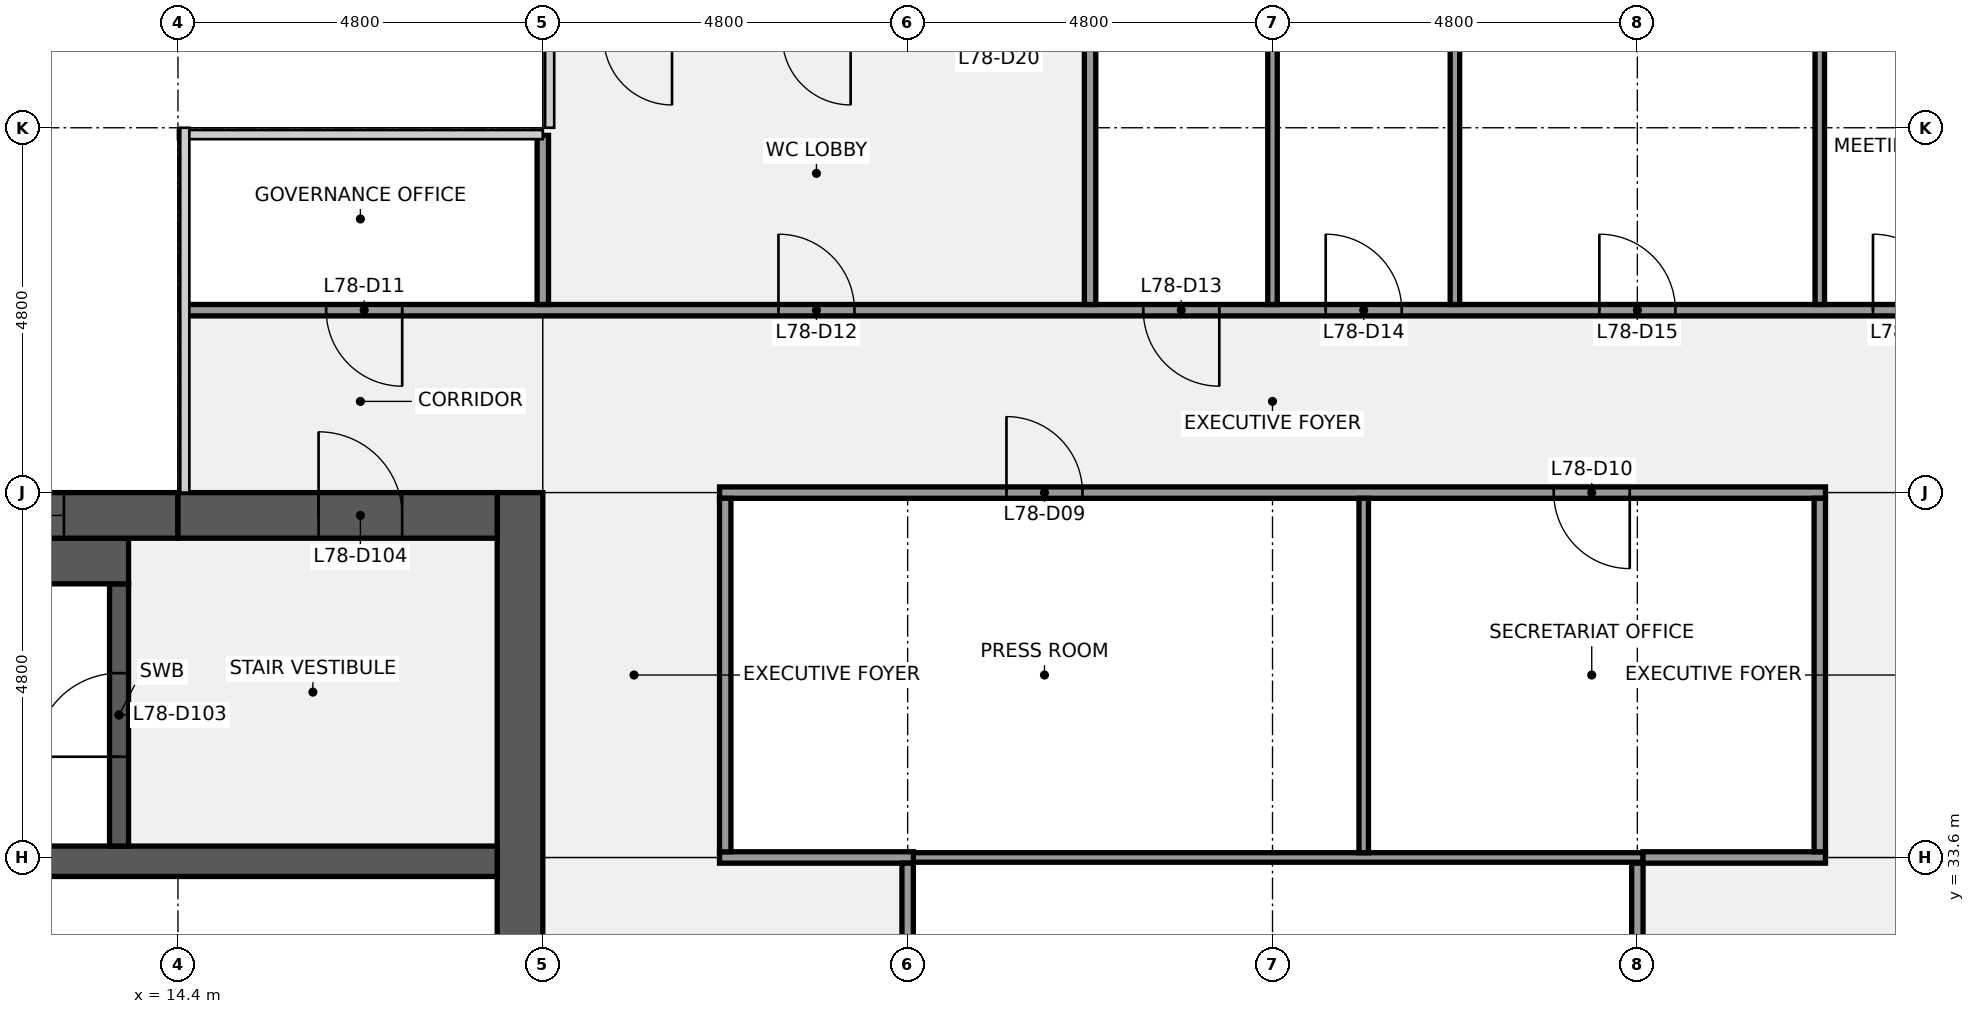
"""IFC4 building model, lengths in metres.
Left out: names, types, materials, properties, quantities, classifications, styles, units other than length and angle.
Written with IfcOpenShell. Run it as: python <this file> out.ifc"""

import sys

from ifc_helpers import new_model, si_unit, direction, frame, frame_2d, origin, place, context, subcontext, project, spatial, rectangle, extrude, element, fill, save


model = new_model("IFC4")
c1 = context("Model", 3, precision=1e-05, world=origin(), true_north=direction((0.0, 1.0)))
c2 = subcontext(c1, "Body", "Model", "MODEL_VIEW")
j1 = project(units=[si_unit("LENGTHUNIT", "METRE"), si_unit("PLANEANGLEUNIT", "RADIAN")], contexts=[c1])
p1 = place(None, origin())
s1 = spatial("IfcSite", under=j1, at=p1, CompositionType="ELEMENT")
p2 = place(p1, origin())
s2 = spatial("IfcBuilding", under=s1, at=p2, CompositionType="ELEMENT")
p3 = place(p2, frame((0.0, 0.0, 350.3)))
s3 = spatial("IfcBuildingStorey", under=s2, at=p3, CompositionType="ELEMENT", Elevation=350.3)
p4 = place(p3, frame((18.9, 38.4, 0.0), z_axis=(0.0, 0.0, 1.0), x_axis=(0.0, -1.0, 0.0)))
e1 = element("IfcWall", 1, at=p4, inside=s3, PredefinedType="SHEAR", context=c2, shape_type="SweptSolid", body=[
    extrude(rectangle(XDim=28.8, YDim=0.6, at=frame_2d((14.4, 0.0))), origin(), (0.0, 0.0, 1.0), 3.75),
])
p5 = place(p4, frame((18.3, 0.0, 0.0)))
e2 = element("IfcOpeningElement", 2, at=p5, cuts=e1, PredefinedType="OPENING", context=c2, shape_type="SweptSolid", body=[
    extrude(rectangle(XDim=1.8, YDim=2.1, at=frame_2d((0.9, 1.05))), frame((0.0, 0.31, 0.0), z_axis=(0.0, -1.0, 0.0), x_axis=(1.0, 0.0, 0.0)), (0.0, 0.0, 1.0), 0.62),
])
p6 = place(p4, frame((8.7, 0.0, 0.0)))
e3 = element("IfcOpeningElement", 3, at=p6, cuts=e1, PredefinedType="OPENING", context=c2, shape_type="SweptSolid", body=[
    extrude(rectangle(XDim=1.8, YDim=2.1, at=frame_2d((0.9, 1.05))), frame((0.0, 0.31, 0.0), z_axis=(0.0, -1.0, 0.0), x_axis=(1.0, 0.0, 0.0)), (0.0, 0.0, 1.0), 0.62),
])
p7 = place(p3, frame((0.6, 33.55, 0.0), z_axis=(0.0, 0.0, 1.0), x_axis=(1.0, 0.0, 0.0)))
e4 = element("IfcWall", 4, at=p7, inside=s3, PredefinedType="SHEAR", context=c2, shape_type="SweptSolid", body=[
    extrude(rectangle(XDim=18.0, YDim=0.4, at=frame_2d((9.0, 0.0))), origin(), (0.0, 0.0, 1.0), 3.75),
])
p8 = place(p3, frame((13.625, 33.75, 0.0), z_axis=(0.0, 0.0, 1.0), x_axis=(0.0, 1.0, 0.0)))
e5 = element("IfcWall", 5, at=p8, inside=s3, PredefinedType="SHEAR", context=c2, shape_type="SweptSolid", body=[
    extrude(rectangle(XDim=3.45, YDim=0.25, at=frame_2d((1.725, 0.0))), origin(), (0.0, 0.0, 1.0), 3.75),
])
p9 = place(p8, frame((1.175, 0.0, 0.0)))
e6 = element("IfcOpeningElement", 6, at=p9, cuts=e5, PredefinedType="OPENING", context=c2, shape_type="SweptSolid", body=[
    extrude(rectangle(XDim=1.1, YDim=2.1, at=frame_2d((0.55, 1.05))), frame((0.0, 0.135, 0.0), z_axis=(0.0, -1.0, 0.0), x_axis=(1.0, 0.0, 0.0)), (0.0, 0.0, 1.0), 0.27),
])
p10 = place(p3, frame((6.25, 37.5, 0.0), z_axis=(0.0, 0.0, 1.0), x_axis=(1.0, 0.0, 0.0)))
e7 = element("IfcWall", 7, at=p10, inside=s3, PredefinedType="SHEAR", context=c2, shape_type="SweptSolid", body=[
    extrude(rectangle(XDim=7.5, YDim=0.6, at=frame_2d((3.75, 0.0))), origin(), (0.0, 0.0, 1.0), 3.75),
])
p11 = place(p3, frame((0.6, 38.1, 0.0), z_axis=(0.0, 0.0, 1.0), x_axis=(1.0, 0.0, 0.0)))
e8 = element("IfcWall", 8, at=p11, inside=s3, PredefinedType="SHEAR", context=c2, shape_type="SweptSolid", body=[
    extrude(rectangle(XDim=13.8, YDim=0.6, at=frame_2d((6.9, 0.0))), origin(), (0.0, 0.0, 1.0), 3.75),
])
p12 = place(p11, frame((5.7, 0.0, 0.9)))
e9 = element("IfcOpeningElement", 9, at=p12, cuts=e8, PredefinedType="OPENING", context=c2, shape_type="SweptSolid", body=[
    extrude(rectangle(XDim=1.8, YDim=1.5, at=frame_2d((0.9, 0.75))), frame((0.0, 0.31, 0.0), z_axis=(0.0, -1.0, 0.0), x_axis=(1.0, 0.0, 0.0)), (0.0, 0.0, 1.0), 0.62),
])
p13 = place(p11, frame((10.5, 0.0, 0.9)))
e10 = element("IfcOpeningElement", 10, at=p13, cuts=e8, PredefinedType="OPENING", context=c2, shape_type="SweptSolid", body=[
    extrude(rectangle(XDim=1.8, YDim=1.5, at=frame_2d((0.9, 0.75))), frame((0.0, 0.31, 0.0), z_axis=(0.0, -1.0, 0.0), x_axis=(1.0, 0.0, 0.0)), (0.0, 0.0, 1.0), 0.62),
])
p14 = place(p3, frame((14.4, 38.1, 0.0), z_axis=(0.0, 0.0, 1.0), x_axis=(1.0, 0.0, 0.0)))
e11 = element("IfcWall", 11, at=p14, inside=s3, PredefinedType="SHEAR", context=c2, shape_type="SweptSolid", body=[
    extrude(rectangle(XDim=4.2, YDim=0.6, at=frame_2d((2.1, 0.0))), origin(), (0.0, 0.0, 1.0), 3.75),
])
p15 = place(p14, frame((1.85, 0.0, 0.0)))
e12 = element("IfcOpeningElement", 12, at=p15, cuts=e11, PredefinedType="OPENING", context=c2, shape_type="SweptSolid", body=[
    extrude(rectangle(XDim=1.1, YDim=2.1, at=frame_2d((0.55, 1.05))), frame((0.0, 0.31, 0.0), z_axis=(0.0, -1.0, 0.0), x_axis=(1.0, 0.0, 0.0)), (0.0, 0.0, 1.0), 0.62),
])
p16 = place(p3, frame((24.075, 33.6, 0.0), z_axis=(0.0, 0.0, 1.0), x_axis=(1.0, 0.0, 0.0)))
e13 = element("IfcWall", 13, at=p16, inside=s3, PredefinedType="PARTITIONING", context=c2, shape_type="SweptSolid", body=[
    extrude(rectangle(XDim=9.6, YDim=0.125, at=frame_2d((4.8, 0.0))), origin(), (0.0, 0.0, 1.0), 2.759),
])
p17 = place(p3, frame((21.525, 33.6, 0.0), z_axis=(0.0, 0.0, 1.0), x_axis=(1.0, 0.0, 0.0)))
e14 = element("IfcWall", 14, at=p17, inside=s3, PredefinedType="PARTITIONING", context=c2, shape_type="SweptSolid", body=[
    extrude(rectangle(XDim=2.55, YDim=0.15, at=frame_2d((1.275, 0.0))), origin(), (0.0, 0.0, 1.0), 2.759),
])
p18 = place(p3, frame((33.675, 33.6, 0.0), z_axis=(0.0, 0.0, 1.0), x_axis=(1.0, 0.0, 0.0)))
e15 = element("IfcWall", 15, at=p18, inside=s3, PredefinedType="PARTITIONING", context=c2, shape_type="SweptSolid", body=[
    extrude(rectangle(XDim=2.4, YDim=0.15, at=frame_2d((1.2, 0.0))), origin(), (0.0, 0.0, 1.0), 2.759),
])
p19 = place(p3, frame((21.525, 38.4, 0.0), z_axis=(0.0, 0.0, 1.0), x_axis=(1.0, 0.0, 0.0)))
e16 = element("IfcWall", 16, at=p19, inside=s3, PredefinedType="PARTITIONING", context=c2, shape_type="SweptSolid", body=[
    extrude(rectangle(XDim=14.55, YDim=0.15, at=frame_2d((7.275, 0.0))), origin(), (0.0, 0.0, 1.0), 2.759),
])
p20 = place(p19, frame((3.775, 0.0, 0.0)))
e17 = element("IfcOpeningElement", 17, at=p20, cuts=e16, PredefinedType="OPENING", context=c2, shape_type="SweptSolid", body=[
    extrude(rectangle(XDim=1.0, YDim=2.1, at=frame_2d((0.5, 1.05))), frame((0.0, 0.085, 0.0), z_axis=(0.0, -1.0, 0.0), x_axis=(1.0, 0.0, 0.0)), (0.0, 0.0, 1.0), 0.17),
])
p21 = place(p19, frame((10.975, 0.0, 0.0)))
e18 = element("IfcOpeningElement", 18, at=p21, cuts=e16, PredefinedType="OPENING", context=c2, shape_type="SweptSolid", body=[
    extrude(rectangle(XDim=1.0, YDim=2.1, at=frame_2d((0.5, 1.05))), frame((0.0, 0.085, 0.0), z_axis=(0.0, -1.0, 0.0), x_axis=(1.0, 0.0, 0.0)), (0.0, 0.0, 1.0), 0.17),
])
p22 = place(p3, frame((14.5, 40.8, 0.0), z_axis=(0.0, 0.0, 1.0), x_axis=(1.0, 0.0, 0.0)))
e19 = element("IfcWall", 19, at=p22, inside=s3, PredefinedType="PARTITIONING", context=c2, shape_type="SweptSolid", body=[
    extrude(rectangle(XDim=28.6, YDim=0.15, at=frame_2d((14.3, 0.0))), origin(), (0.0, 0.0, 1.0), 2.759),
])
p23 = place(p22, frame((1.85, 0.0, 0.0)))
e20 = element("IfcOpeningElement", 20, at=p23, cuts=e19, PredefinedType="OPENING", context=c2, shape_type="SweptSolid", body=[
    extrude(rectangle(XDim=1.0, YDim=2.1, at=frame_2d((0.5, 1.05))), frame((0.0, 0.085, 0.0), z_axis=(0.0, -1.0, 0.0), x_axis=(1.0, 0.0, 0.0)), (0.0, 0.0, 1.0), 0.17),
])
p24 = place(p22, frame((7.8, 0.0, 0.0)))
e21 = element("IfcOpeningElement", 21, at=p24, cuts=e19, PredefinedType="OPENING", context=c2, shape_type="SweptSolid", body=[
    extrude(rectangle(XDim=1.0, YDim=2.1, at=frame_2d((0.5, 1.05))), frame((0.0, 0.085, 0.0), z_axis=(0.0, -1.0, 0.0), x_axis=(1.0, 0.0, 0.0)), (0.0, 0.0, 1.0), 0.17),
])
p25 = place(p22, frame((12.6, 0.0, 0.0)))
e22 = element("IfcOpeningElement", 22, at=p25, cuts=e19, PredefinedType="OPENING", context=c2, shape_type="SweptSolid", body=[
    extrude(rectangle(XDim=1.0, YDim=2.1, at=frame_2d((0.5, 1.05))), frame((0.0, 0.085, 0.0), z_axis=(0.0, -1.0, 0.0), x_axis=(1.0, 0.0, 0.0)), (0.0, 0.0, 1.0), 0.17),
])
p26 = place(p22, frame((15.0, 0.0, 0.0)))
e23 = element("IfcOpeningElement", 23, at=p26, cuts=e19, PredefinedType="OPENING", context=c2, shape_type="SweptSolid", body=[
    extrude(rectangle(XDim=1.0, YDim=2.1, at=frame_2d((0.5, 1.05))), frame((0.0, 0.085, 0.0), z_axis=(0.0, -1.0, 0.0), x_axis=(1.0, 0.0, 0.0)), (0.0, 0.0, 1.0), 0.17),
])
p27 = place(p22, frame((18.6, 0.0, 0.0)))
e24 = element("IfcOpeningElement", 24, at=p27, cuts=e19, PredefinedType="OPENING", context=c2, shape_type="SweptSolid", body=[
    extrude(rectangle(XDim=1.0, YDim=2.1, at=frame_2d((0.5, 1.05))), frame((0.0, 0.085, 0.0), z_axis=(0.0, -1.0, 0.0), x_axis=(1.0, 0.0, 0.0)), (0.0, 0.0, 1.0), 0.17),
])
p28 = place(p22, frame((22.2, 0.0, 0.0)))
e25 = element("IfcOpeningElement", 25, at=p28, cuts=e19, PredefinedType="OPENING", context=c2, shape_type="SweptSolid", body=[
    extrude(rectangle(XDim=1.0, YDim=2.1, at=frame_2d((0.5, 1.05))), frame((0.0, 0.085, 0.0), z_axis=(0.0, -1.0, 0.0), x_axis=(1.0, 0.0, 0.0)), (0.0, 0.0, 1.0), 0.17),
])
p29 = place(p22, frame((25.75, 0.0, 0.0)))
e26 = element("IfcOpeningElement", 26, at=p29, cuts=e19, PredefinedType="OPENING", context=c2, shape_type="SweptSolid", body=[
    extrude(rectangle(XDim=1.0, YDim=2.1, at=frame_2d((0.5, 1.05))), frame((0.0, 0.085, 0.0), z_axis=(0.0, -1.0, 0.0), x_axis=(1.0, 0.0, 0.0)), (0.0, 0.0, 1.0), 0.17),
])
p30 = place(p3, frame((19.2, 40.875, 0.0), z_axis=(0.0, 0.0, 1.0), x_axis=(0.0, 1.0, 0.0)))
e27 = element("IfcWall", 27, at=p30, inside=s3, PredefinedType="PARTITIONING", context=c2, shape_type="SweptSolid", body=[
    extrude(rectangle(XDim=2.225, YDim=0.15, at=frame_2d((1.113, 0.0))), origin(), (0.0, 0.0, 1.0), 2.759),
])
p31 = place(p3, frame((21.6, 33.675, 0.0), z_axis=(0.0, 0.0, 1.0), x_axis=(0.0, 1.0, 0.0)))
e28 = element("IfcWall", 28, at=p31, inside=s3, PredefinedType="PARTITIONING", context=c2, shape_type="SweptSolid", body=[
    extrude(rectangle(XDim=4.65, YDim=0.15, at=frame_2d((2.325, 0.0))), origin(), (0.0, 0.0, 1.0), 2.759),
])
p32 = place(p3, frame((24.0, 24.075, 0.0), z_axis=(0.0, 0.0, 1.0), x_axis=(0.0, 1.0, 0.0)))
e29 = element("IfcWall", 29, at=p32, inside=s3, PredefinedType="PARTITIONING", context=c2, shape_type="SweptSolid", body=[
    extrude(rectangle(XDim=9.45, YDim=0.15, at=frame_2d((4.725, 0.0))), origin(), (0.0, 0.0, 1.0), 2.759),
])
p33 = place(p32, frame((4.225, 0.0, 0.0)))
e30 = element("IfcOpeningElement", 30, at=p33, cuts=e29, PredefinedType="OPENING", context=c2, shape_type="SweptSolid", body=[
    extrude(rectangle(XDim=1.0, YDim=2.1, at=frame_2d((0.5, 1.05))), frame((0.0, 0.085, 0.0), z_axis=(0.0, -1.0, 0.0), x_axis=(1.0, 0.0, 0.0)), (0.0, 0.0, 1.0), 0.17),
])
p34 = place(p3, frame((26.4, 40.875, 0.0), z_axis=(0.0, 0.0, 1.0), x_axis=(0.0, 1.0, 0.0)))
e31 = element("IfcWall", 31, at=p34, inside=s3, PredefinedType="PARTITIONING", context=c2, shape_type="SweptSolid", body=[
    extrude(rectangle(XDim=3.45, YDim=0.15, at=frame_2d((1.725, 0.0))), origin(), (0.0, 0.0, 1.0), 2.759),
])
p35 = place(p3, frame((28.8, 40.875, 0.0), z_axis=(0.0, 0.0, 1.0), x_axis=(0.0, 1.0, 0.0)))
e32 = element("IfcWall", 32, at=p35, inside=s3, PredefinedType="PARTITIONING", context=c2, shape_type="SweptSolid", body=[
    extrude(rectangle(XDim=6.625, YDim=0.125, at=frame_2d((3.312, 0.0))), origin(), (0.0, 0.0, 1.0), 2.759),
])
p36 = place(p3, frame((30.0, 33.663, 0.0), z_axis=(0.0, 0.0, 1.0), x_axis=(0.0, 1.0, 0.0)))
e33 = element("IfcWall", 33, at=p36, inside=s3, PredefinedType="PARTITIONING", context=c2, shape_type="SweptSolid", body=[
    extrude(rectangle(XDim=4.662, YDim=0.125, at=frame_2d((2.331, 0.0))), origin(), (0.0, 0.0, 1.0), 2.759),
])
p37 = place(p3, frame((31.2, 40.875, 0.0), z_axis=(0.0, 0.0, 1.0), x_axis=(0.0, 1.0, 0.0)))
e34 = element("IfcWall", 34, at=p37, inside=s3, PredefinedType="PARTITIONING", context=c2, shape_type="SweptSolid", body=[
    extrude(rectangle(XDim=7.025, YDim=0.125, at=frame_2d((3.512, 0.0))), origin(), (0.0, 0.0, 1.0), 2.759),
])
p38 = place(p3, frame((33.6, 24.075, 0.0), z_axis=(0.0, 0.0, 1.0), x_axis=(0.0, 1.0, 0.0)))
e35 = element("IfcWall", 35, at=p38, inside=s3, PredefinedType="PARTITIONING", context=c2, shape_type="SweptSolid", body=[
    extrude(rectangle(XDim=9.45, YDim=0.15, at=frame_2d((4.725, 0.0))), origin(), (0.0, 0.0, 1.0), 2.759),
])
p39 = place(p3, frame((36.0, 40.875, 0.0), z_axis=(0.0, 0.0, 1.0), x_axis=(0.0, 1.0, 0.0)))
e36 = element("IfcWall", 36, at=p39, inside=s3, PredefinedType="PARTITIONING", context=c2, shape_type="SweptSolid", body=[
    extrude(rectangle(XDim=7.025, YDim=0.125, at=frame_2d((3.512, 0.0))), origin(), (0.0, 0.0, 1.0), 2.759),
])
p40 = place(p3, frame((36.0, 33.675, 0.0), z_axis=(0.0, 0.0, 1.0), x_axis=(0.0, 1.0, 0.0)))
e37 = element("IfcWall", 37, at=p40, inside=s3, PredefinedType="PARTITIONING", context=c2, shape_type="SweptSolid", body=[
    extrude(rectangle(XDim=4.65, YDim=0.15, at=frame_2d((2.325, 0.0))), origin(), (0.0, 0.0, 1.0), 2.759),
])
p41 = place(p9, origin())
e38 = element("IfcDoor", 38, at=p41, inside=s3, OperationType="SINGLE_SWING_LEFT", PredefinedType="DOOR", context=c2, shape_type="SweptSolid", body=[
    extrude(rectangle(XDim=1.1, YDim=2.1, at=frame_2d((0.55, 1.05))), frame((0.0, 0.025, 0.0), z_axis=(0.0, -1.0, 0.0), x_axis=(1.0, 0.0, 0.0)), (0.0, 0.0, 1.0), 0.05),
])
fill(e6, e38)
p42 = place(p15, origin())
e39 = element("IfcDoor", 39, at=p42, inside=s3, OperationType="SINGLE_SWING_LEFT", PredefinedType="DOOR", context=c2, shape_type="SweptSolid", body=[
    extrude(rectangle(XDim=1.1, YDim=2.1, at=frame_2d((0.55, 1.05))), frame((0.0, 0.025, 0.0), z_axis=(0.0, -1.0, 0.0), x_axis=(1.0, 0.0, 0.0)), (0.0, 0.0, 1.0), 0.05),
])
fill(e12, e39)
p43 = place(p13, origin())
e40 = element("IfcWindow", 40, at=p43, inside=s3, PartitioningType="SINGLE_PANEL", PredefinedType="WINDOW", context=c2, shape_type="SweptSolid", body=[
    extrude(rectangle(XDim=1.8, YDim=1.5, at=frame_2d((0.9, 0.75))), frame((0.0, 0.03, 0.0), z_axis=(0.0, -1.0, 0.0), x_axis=(1.0, 0.0, 0.0)), (0.0, 0.0, 1.0), 0.06),
])
fill(e10, e40)
p44 = place(p20, origin())
e41 = element("IfcDoor", 41, at=p44, inside=s3, OperationType="SINGLE_SWING_LEFT", PredefinedType="DOOR", context=c2, shape_type="SweptSolid", body=[
    extrude(rectangle(XDim=1.0, YDim=2.1, at=frame_2d((0.5, 1.05))), frame((0.0, 0.025, 0.0), z_axis=(0.0, -1.0, 0.0), x_axis=(1.0, 0.0, 0.0)), (0.0, 0.0, 1.0), 0.05),
])
fill(e17, e41)
p45 = place(p21, origin())
e42 = element("IfcDoor", 42, at=p45, inside=s3, OperationType="SINGLE_SWING_RIGHT", PredefinedType="DOOR", context=c2, shape_type="SweptSolid", body=[
    extrude(rectangle(XDim=1.0, YDim=2.1, at=frame_2d((0.5, 1.05))), frame((0.0, 0.025, 0.0), z_axis=(0.0, -1.0, 0.0), x_axis=(1.0, 0.0, 0.0)), (0.0, 0.0, 1.0), 0.05),
])
fill(e18, e42)
p46 = place(p23, origin())
e43 = element("IfcDoor", 43, at=p46, inside=s3, OperationType="SINGLE_SWING_RIGHT", PredefinedType="DOOR", context=c2, shape_type="SweptSolid", body=[
    extrude(rectangle(XDim=1.0, YDim=2.1, at=frame_2d((0.5, 1.05))), frame((0.0, 0.025, 0.0), z_axis=(0.0, -1.0, 0.0), x_axis=(1.0, 0.0, 0.0)), (0.0, 0.0, 1.0), 0.05),
])
fill(e20, e43)
p47 = place(p24, origin())
e44 = element("IfcDoor", 44, at=p47, inside=s3, OperationType="SINGLE_SWING_LEFT", PredefinedType="DOOR", context=c2, shape_type="SweptSolid", body=[
    extrude(rectangle(XDim=1.0, YDim=2.1, at=frame_2d((0.5, 1.05))), frame((0.0, 0.025, 0.0), z_axis=(0.0, -1.0, 0.0), x_axis=(1.0, 0.0, 0.0)), (0.0, 0.0, 1.0), 0.05),
])
fill(e21, e44)
p48 = place(p25, origin())
e45 = element("IfcDoor", 45, at=p48, inside=s3, OperationType="SINGLE_SWING_RIGHT", PredefinedType="DOOR", context=c2, shape_type="SweptSolid", body=[
    extrude(rectangle(XDim=1.0, YDim=2.1, at=frame_2d((0.5, 1.05))), frame((0.0, 0.025, 0.0), z_axis=(0.0, -1.0, 0.0), x_axis=(1.0, 0.0, 0.0)), (0.0, 0.0, 1.0), 0.05),
])
fill(e22, e45)
p49 = place(p26, origin())
e46 = element("IfcDoor", 46, at=p49, inside=s3, OperationType="SINGLE_SWING_LEFT", PredefinedType="DOOR", context=c2, shape_type="SweptSolid", body=[
    extrude(rectangle(XDim=1.0, YDim=2.1, at=frame_2d((0.5, 1.05))), frame((0.0, 0.025, 0.0), z_axis=(0.0, -1.0, 0.0), x_axis=(1.0, 0.0, 0.0)), (0.0, 0.0, 1.0), 0.05),
])
fill(e23, e46)
p50 = place(p27, origin())
e47 = element("IfcDoor", 47, at=p50, inside=s3, OperationType="SINGLE_SWING_LEFT", PredefinedType="DOOR", context=c2, shape_type="SweptSolid", body=[
    extrude(rectangle(XDim=1.0, YDim=2.1, at=frame_2d((0.5, 1.05))), frame((0.0, 0.025, 0.0), z_axis=(0.0, -1.0, 0.0), x_axis=(1.0, 0.0, 0.0)), (0.0, 0.0, 1.0), 0.05),
])
fill(e24, e47)
p51 = place(p28, origin())
e48 = element("IfcDoor", 48, at=p51, inside=s3, OperationType="SINGLE_SWING_LEFT", PredefinedType="DOOR", context=c2, shape_type="SweptSolid", body=[
    extrude(rectangle(XDim=1.0, YDim=2.1, at=frame_2d((0.5, 1.05))), frame((0.0, 0.025, 0.0), z_axis=(0.0, -1.0, 0.0), x_axis=(1.0, 0.0, 0.0)), (0.0, 0.0, 1.0), 0.05),
])
fill(e25, e48)
save(model, sys.argv[1])
